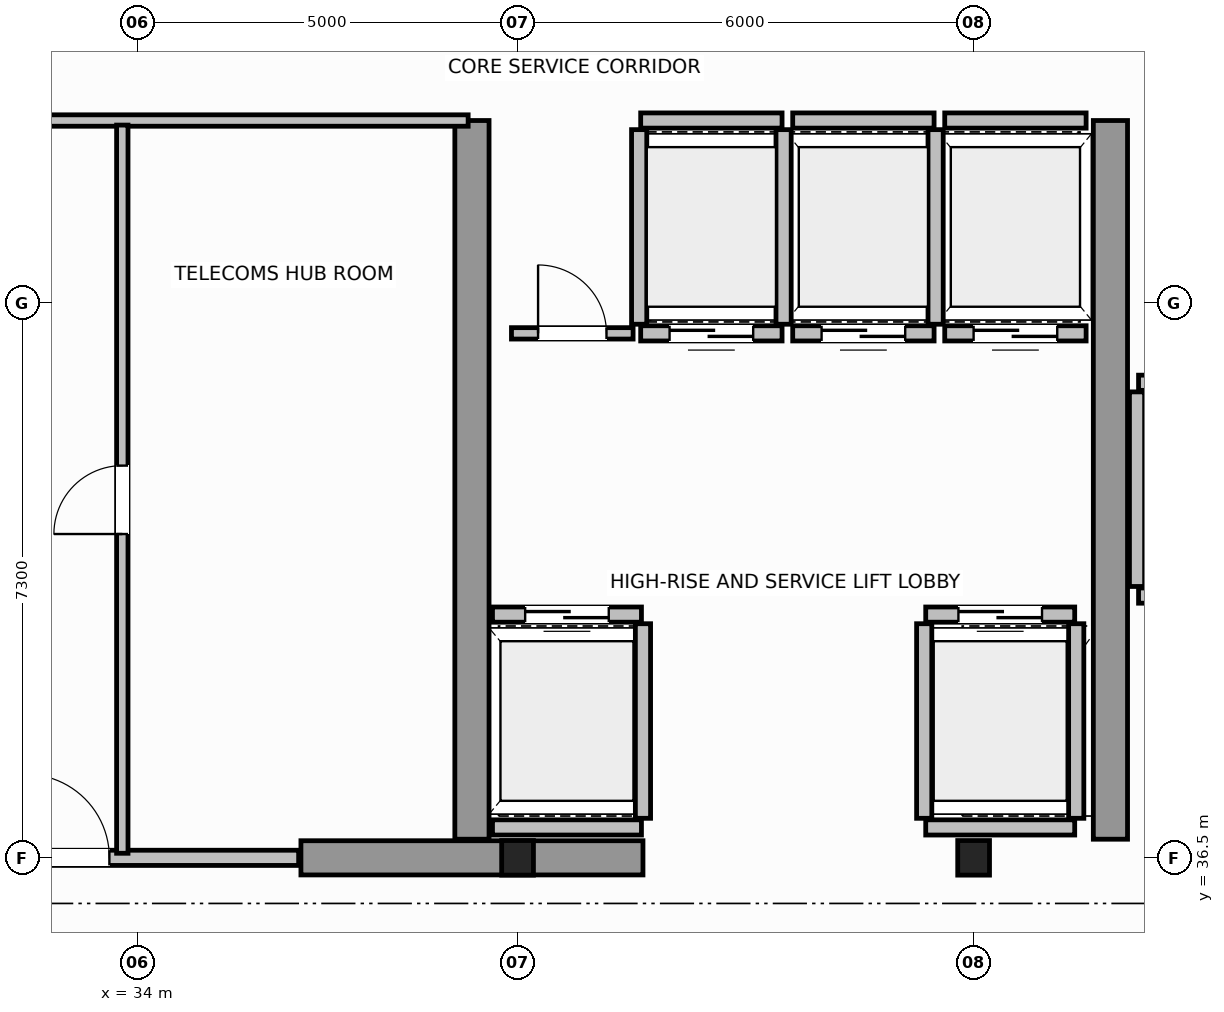
"""IFC4 building model, lengths in metres.
Left out: names, types, materials, properties, quantities, classifications, styles, units other than length and angle.
Written with IfcOpenShell. Run it as: python <this file> out.ifc"""

import sys

from ifc_helpers import new_model, si_unit, direction, frame, frame_2d, origin, origin_2d, place, context, subcontext, project, spatial, rectangle, i_section, extrude, source, transform, mapped, element, fill, save


model = new_model("IFC4")
c1 = context("Model", 3, precision=1e-05, world=origin(), true_north=direction((0.0, 1.0)))
c2 = subcontext(c1, "Body", "Model", "MODEL_VIEW")
j1 = project(units=[si_unit("LENGTHUNIT", "METRE"), si_unit("PLANEANGLEUNIT", "RADIAN")], contexts=[c1])
p1 = place(None, origin())
s1 = spatial("IfcSite", under=j1, at=p1, CompositionType="ELEMENT")
p2 = place(p1, origin())
s2 = spatial("IfcBuilding", under=s1, at=p2, CompositionType="ELEMENT")
p3 = place(p2, frame((0.0, 0.0, 268.8)))
s3 = spatial("IfcBuildingStorey", under=s2, at=p3, CompositionType="ELEMENT", Elevation=268.8)
m1 = source(origin(), c2, "Body", "SweptSolid", [
    extrude(i_section(OverallWidth=0.418, OverallDepth=0.455, WebThickness=0.042, FlangeThickness=0.058, FilletRadius=0.015, at=origin_2d()), origin(), (0.0, 0.0, 1.0), 3.8),
])
for number, where, z_axis, x_axis in (
    (1, (39.0, 36.5, 0.0), (0.0, 0.0, 1.0), (1.0, 0.0, 0.0)),
    (2, (45.0, 36.5, 0.0), (0.0, 0.0, 1.0), (1.0, 0.0, 0.0)),
):
    element("IfcColumn", number, at=place(p3, frame(where, z_axis=z_axis, x_axis=x_axis)), inside=s3, PredefinedType="COLUMN", context=c2, shape_type="MappedRepresentation", body=[
        mapped(m1, transform((0.0, 0.0, 0.0), scale=1.0)),
    ])
p4 = place(p3, frame((36.15, 36.5, 0.0), z_axis=(0.0, 0.0, 1.0), x_axis=(1.0, 0.0, 0.0)))
e3 = element("IfcWall", 3, at=p4, inside=s3, PredefinedType="SHEAR", context=c2, shape_type="SweptSolid", body=[
    extrude(rectangle(XDim=4.5, YDim=0.45, at=frame_2d((2.25, 0.0))), origin(), (0.0, 0.0, 1.0), 3.8),
])
for number, where, z_axis, x_axis in (
    (4, (38.4, 36.745, 0.0), (0.0, 0.0, 1.0), (0.0, 1.0, 0.0)),
    (5, (46.8, 36.745, 0.0), (0.0, 0.0, 1.0), (0.0, 1.0, 0.0)),
):
    element("IfcWall", number, at=place(p3, frame(where, z_axis=z_axis, x_axis=x_axis)), inside=s3, PredefinedType="SHEAR", context=c2, shape_type="SweptSolid", body=[
        extrude(rectangle(XDim=9.455, YDim=0.45, at=frame_2d((4.728, 0.0))), origin(), (0.0, 0.0, 1.0), 3.8),
    ])
p5 = place(p3, frame((38.67, 39.7, 0.0), z_axis=(0.0, 0.0, 1.0), x_axis=(1.0, 0.0, 0.0)))
e6 = element("IfcWall", 6, at=p5, inside=s3, PredefinedType="SOLIDWALL", context=c2, shape_type="SweptSolid", body=[
    extrude(rectangle(XDim=1.96, YDim=0.2, at=frame_2d((0.98, 0.0))), origin(), (0.0, 0.0, 1.0), 3.58),
])
p6 = place(p5, frame((0.43, 0.0, 0.0)))
e7 = element("IfcOpeningElement", 7, at=p6, cuts=e6, PredefinedType="OPENING", context=c2, shape_type="SweptSolid", body=[
    extrude(rectangle(XDim=1.1, YDim=2.15, at=frame_2d((0.55, 1.075))), frame((0.0, 0.11, 0.0), z_axis=(0.0, -1.0, 0.0), x_axis=(1.0, 0.0, 0.0)), (0.0, 0.0, 1.0), 0.22),
])
p7 = place(p3, frame((38.67, 36.9, 0.0), z_axis=(0.0, 0.0, 1.0), x_axis=(1.0, 0.0, 0.0)))
e8 = element("IfcWall", 8, at=p7, inside=s3, PredefinedType="SOLIDWALL", context=c2, shape_type="SweptSolid", body=[
    extrude(rectangle(XDim=1.96, YDim=0.2, at=frame_2d((0.98, 0.0))), origin(), (0.0, 0.0, 1.0), 3.58),
])
p8 = place(p3, frame((40.65, 37.02, 0.0), z_axis=(0.0, 0.0, 1.0), x_axis=(0.0, 1.0, 0.0)))
e9 = element("IfcWall", 9, at=p8, inside=s3, PredefinedType="SOLIDWALL", context=c2, shape_type="SweptSolid", body=[
    extrude(rectangle(XDim=2.56, YDim=0.2, at=frame_2d((1.28, 0.0))), origin(), (0.0, 0.0, 1.0), 3.58),
])
p9 = place(p3, frame((44.37, 39.7, 0.0), z_axis=(0.0, 0.0, 1.0), x_axis=(1.0, 0.0, 0.0)))
e10 = element("IfcWall", 10, at=p9, inside=s3, PredefinedType="SOLIDWALL", context=c2, shape_type="SweptSolid", body=[
    extrude(rectangle(XDim=1.96, YDim=0.2, at=frame_2d((0.98, 0.0))), origin(), (0.0, 0.0, 1.0), 3.58),
])
p10 = place(p9, frame((0.43, 0.0, 0.0)))
e11 = element("IfcOpeningElement", 11, at=p10, cuts=e10, PredefinedType="OPENING", context=c2, shape_type="SweptSolid", body=[
    extrude(rectangle(XDim=1.1, YDim=2.15, at=frame_2d((0.55, 1.075))), frame((0.0, 0.11, 0.0), z_axis=(0.0, -1.0, 0.0), x_axis=(1.0, 0.0, 0.0)), (0.0, 0.0, 1.0), 0.22),
])
p11 = place(p3, frame((44.37, 36.9, 0.0), z_axis=(0.0, 0.0, 1.0), x_axis=(1.0, 0.0, 0.0)))
e12 = element("IfcWall", 12, at=p11, inside=s3, PredefinedType="SOLIDWALL", context=c2, shape_type="SweptSolid", body=[
    extrude(rectangle(XDim=1.96, YDim=0.2, at=frame_2d((0.98, 0.0))), origin(), (0.0, 0.0, 1.0), 2.57),
])
for number, where, z_axis, x_axis in (
    (13, (44.35, 37.02, 0.0), (0.0, 0.0, 1.0), (0.0, 1.0, 0.0)),
    (14, (46.35, 37.02, 0.0), (0.0, 0.0, 1.0), (0.0, 1.0, 0.0)),
):
    element("IfcWall", number, at=place(p3, frame(where, z_axis=z_axis, x_axis=x_axis)), inside=s3, PredefinedType="SOLIDWALL", context=c2, shape_type="SweptSolid", body=[
        extrude(rectangle(XDim=2.56, YDim=0.2, at=frame_2d((1.28, 0.0))), origin(), (0.0, 0.0, 1.0), 3.58),
    ])
p12 = place(p3, frame((40.62, 43.4, 0.0), z_axis=(0.0, 0.0, 1.0), x_axis=(1.0, 0.0, 0.0)))
e15 = element("IfcWall", 15, at=p12, inside=s3, PredefinedType="SOLIDWALL", context=c2, shape_type="SweptSolid", body=[
    extrude(rectangle(XDim=1.86, YDim=0.2, at=frame_2d((0.93, 0.0))), origin(), (0.0, 0.0, 1.0), 3.58),
])
p13 = place(p12, frame((0.38, 0.0, 0.0)))
e16 = element("IfcOpeningElement", 16, at=p13, cuts=e15, PredefinedType="OPENING", context=c2, shape_type="SweptSolid", body=[
    extrude(rectangle(XDim=1.1, YDim=2.15, at=frame_2d((0.55, 1.075))), frame((0.0, 0.11, 0.0), z_axis=(0.0, -1.0, 0.0), x_axis=(1.0, 0.0, 0.0)), (0.0, 0.0, 1.0), 0.22),
])
p14 = place(p3, frame((40.62, 46.2, 0.0), z_axis=(0.0, 0.0, 1.0), x_axis=(1.0, 0.0, 0.0)))
e17 = element("IfcWall", 17, at=p14, inside=s3, PredefinedType="SOLIDWALL", context=c2, shape_type="SweptSolid", body=[
    extrude(rectangle(XDim=1.86, YDim=0.2, at=frame_2d((0.93, 0.0))), origin(), (0.0, 0.0, 1.0), 3.58),
])
for number, where, z_axis, x_axis in (
    (18, (40.6, 43.52, 0.0), (0.0, 0.0, 1.0), (0.0, 1.0, 0.0)),
    (19, (42.5, 43.52, 0.0), (0.0, 0.0, 1.0), (0.0, 1.0, 0.0)),
):
    element("IfcWall", number, at=place(p3, frame(where, z_axis=z_axis, x_axis=x_axis)), inside=s3, PredefinedType="SOLIDWALL", context=c2, shape_type="SweptSolid", body=[
        extrude(rectangle(XDim=2.56, YDim=0.2, at=frame_2d((1.28, 0.0))), origin(), (0.0, 0.0, 1.0), 3.58),
    ])
p15 = place(p3, frame((42.62, 43.4, 0.0), z_axis=(0.0, 0.0, 1.0), x_axis=(1.0, 0.0, 0.0)))
e20 = element("IfcWall", 20, at=p15, inside=s3, PredefinedType="SOLIDWALL", context=c2, shape_type="SweptSolid", body=[
    extrude(rectangle(XDim=1.86, YDim=0.2, at=frame_2d((0.93, 0.0))), origin(), (0.0, 0.0, 1.0), 3.58),
])
p16 = place(p15, frame((0.38, 0.0, 0.0)))
e21 = element("IfcOpeningElement", 21, at=p16, cuts=e20, PredefinedType="OPENING", context=c2, shape_type="SweptSolid", body=[
    extrude(rectangle(XDim=1.1, YDim=2.15, at=frame_2d((0.55, 1.075))), frame((0.0, 0.11, 0.0), z_axis=(0.0, -1.0, 0.0), x_axis=(1.0, 0.0, 0.0)), (0.0, 0.0, 1.0), 0.22),
])
p17 = place(p3, frame((42.62, 46.2, 0.0), z_axis=(0.0, 0.0, 1.0), x_axis=(1.0, 0.0, 0.0)))
e22 = element("IfcWall", 22, at=p17, inside=s3, PredefinedType="SOLIDWALL", context=c2, shape_type="SweptSolid", body=[
    extrude(rectangle(XDim=1.86, YDim=0.2, at=frame_2d((0.93, 0.0))), origin(), (0.0, 0.0, 1.0), 3.58),
])
p18 = place(p3, frame((44.5, 43.52, 0.0), z_axis=(0.0, 0.0, 1.0), x_axis=(0.0, 1.0, 0.0)))
e23 = element("IfcWall", 23, at=p18, inside=s3, PredefinedType="SOLIDWALL", context=c2, shape_type="SweptSolid", body=[
    extrude(rectangle(XDim=2.56, YDim=0.2, at=frame_2d((1.28, 0.0))), origin(), (0.0, 0.0, 1.0), 3.58),
])
p19 = place(p3, frame((44.62, 43.4, 0.0), z_axis=(0.0, 0.0, 1.0), x_axis=(1.0, 0.0, 0.0)))
e24 = element("IfcWall", 24, at=p19, inside=s3, PredefinedType="SOLIDWALL", context=c2, shape_type="SweptSolid", body=[
    extrude(rectangle(XDim=1.86, YDim=0.2, at=frame_2d((0.93, 0.0))), origin(), (0.0, 0.0, 1.0), 3.58),
])
p20 = place(p19, frame((0.38, 0.0, 0.0)))
e25 = element("IfcOpeningElement", 25, at=p20, cuts=e24, PredefinedType="OPENING", context=c2, shape_type="SweptSolid", body=[
    extrude(rectangle(XDim=1.1, YDim=2.15, at=frame_2d((0.55, 1.075))), frame((0.0, 0.11, 0.0), z_axis=(0.0, -1.0, 0.0), x_axis=(1.0, 0.0, 0.0)), (0.0, 0.0, 1.0), 0.22),
])
p21 = place(p3, frame((44.62, 46.2, 0.0), z_axis=(0.0, 0.0, 1.0), x_axis=(1.0, 0.0, 0.0)))
e26 = element("IfcWall", 26, at=p21, inside=s3, PredefinedType="SOLIDWALL", context=c2, shape_type="SweptSolid", body=[
    extrude(rectangle(XDim=1.86, YDim=0.2, at=frame_2d((0.93, 0.0))), origin(), (0.0, 0.0, 1.0), 3.58),
])
p22 = place(p3, frame((47.17, 39.95, 0.0), z_axis=(0.0, 0.0, 1.0), x_axis=(1.0, 0.0, 0.0)))
e27 = element("IfcWall", 27, at=p22, inside=s3, PredefinedType="SOLIDWALL", context=c2, shape_type="SweptSolid", body=[
    extrude(rectangle(XDim=2.16, YDim=0.2, at=frame_2d((1.08, 0.0))), origin(), (0.0, 0.0, 1.0), 3.58),
])
p23 = place(p22, frame((0.53, 0.0, 0.0)))
e28 = element("IfcOpeningElement", 28, at=p23, cuts=e27, PredefinedType="OPENING", context=c2, shape_type="SweptSolid", body=[
    extrude(rectangle(XDim=1.1, YDim=2.15, at=frame_2d((0.55, 1.075))), frame((0.0, 0.11, 0.0), z_axis=(0.0, -1.0, 0.0), x_axis=(1.0, 0.0, 0.0)), (0.0, 0.0, 1.0), 0.22),
])
p24 = place(p3, frame((47.17, 42.75, 0.0), z_axis=(0.0, 0.0, 1.0), x_axis=(1.0, 0.0, 0.0)))
e29 = element("IfcWall", 29, at=p24, inside=s3, PredefinedType="SOLIDWALL", context=c2, shape_type="SweptSolid", body=[
    extrude(rectangle(XDim=2.16, YDim=0.2, at=frame_2d((1.08, 0.0))), origin(), (0.0, 0.0, 1.0), 3.58),
])
p25 = place(p3, frame((47.15, 40.07, 0.0), z_axis=(0.0, 0.0, 1.0), x_axis=(0.0, 1.0, 0.0)))
e30 = element("IfcWall", 30, at=p25, inside=s3, PredefinedType="SOLIDWALL", context=c2, shape_type="SweptSolid", body=[
    extrude(rectangle(XDim=2.56, YDim=0.2, at=frame_2d((1.28, 0.0))), origin(), (0.0, 0.0, 1.0), 3.58),
])
p26 = place(p3, frame((32.08, 36.5, 0.0), z_axis=(0.0, 0.0, 1.0), x_axis=(1.0, 0.0, 0.0)))
e31 = element("IfcWall", 31, at=p26, inside=s3, PredefinedType="SOLIDWALL", context=c2, shape_type="SweptSolid", body=[
    extrude(rectangle(XDim=4.04, YDim=0.2, at=frame_2d((2.02, 0.0))), origin(), (0.0, 0.0, 1.0), 3.02),
])
p27 = place(p26, frame((0.45, 0.0, 0.0)))
e32 = element("IfcOpeningElement", 32, at=p27, cuts=e31, PredefinedType="OPENING", context=c2, shape_type="SweptSolid", body=[
    extrude(rectangle(XDim=1.1, YDim=2.15, at=frame_2d((0.55, 1.075))), frame((0.0, 0.11, 0.0), z_axis=(0.0, -1.0, 0.0), x_axis=(1.0, 0.0, 0.0)), (0.0, 0.0, 1.0), 0.22),
])
p28 = place(p3, frame((29.85, 46.2, 0.0), z_axis=(0.0, 0.0, 1.0), x_axis=(1.0, 0.0, 0.0)))
e33 = element("IfcWall", 33, at=p28, inside=s3, PredefinedType="PARTITIONING", context=c2, shape_type="SweptSolid", body=[
    extrude(rectangle(XDim=8.5, YDim=0.15, at=frame_2d((4.25, 0.0))), origin(), (0.0, 0.0, 1.0), 3.58),
])
p29 = place(p3, frame((33.8, 36.56, 0.0), z_axis=(0.0, 0.0, 1.0), x_axis=(0.0, 1.0, 0.0)))
e34 = element("IfcWall", 34, at=p29, inside=s3, PredefinedType="PARTITIONING", context=c2, shape_type="SweptSolid", body=[
    extrude(rectangle(XDim=9.58, YDim=0.15, at=frame_2d((4.79, 0.0))), origin(), (0.0, 0.0, 1.0), 3.58),
])
p30 = place(p29, frame((4.2, 0.0, 0.0)))
e35 = element("IfcOpeningElement", 35, at=p30, cuts=e34, PredefinedType="OPENING", context=c2, shape_type="SweptSolid", body=[
    extrude(rectangle(XDim=0.9, YDim=2.1, at=frame_2d((0.45, 1.05))), frame((0.0, 0.085, 0.0), z_axis=(0.0, -1.0, 0.0), x_axis=(1.0, 0.0, 0.0)), (0.0, 0.0, 1.0), 0.17),
])
p31 = place(p3, frame((38.92, 43.4, 0.0), z_axis=(0.0, 0.0, 1.0), x_axis=(1.0, 0.0, 0.0)))
e36 = element("IfcWall", 36, at=p31, inside=s3, PredefinedType="PARTITIONING", context=c2, shape_type="SweptSolid", body=[
    extrude(rectangle(XDim=1.6, YDim=0.15, at=frame_2d((0.8, 0.0))), origin(), (0.0, 0.0, 1.0), 3.58),
])
p32 = place(p31, frame((0.35, 0.0, 0.0)))
e37 = element("IfcOpeningElement", 37, at=p32, cuts=e36, PredefinedType="OPENING", context=c2, shape_type="SweptSolid", body=[
    extrude(rectangle(XDim=0.9, YDim=2.1, at=frame_2d((0.45, 1.05))), frame((0.0, 0.085, 0.0), z_axis=(0.0, -1.0, 0.0), x_axis=(1.0, 0.0, 0.0)), (0.0, 0.0, 1.0), 0.17),
])
m2 = source(origin(), c2, "Body", "SweptSolid", [
    extrude(rectangle(XDim=1.1, YDim=2.15, at=frame_2d((0.55, 1.075))), frame((0.0, 0.025, 0.0), z_axis=(0.0, -1.0, 0.0), x_axis=(1.0, 0.0, 0.0)), (0.0, 0.0, 1.0), 0.05),
])
p33 = place(p6, origin())
e38 = element("IfcDoor", 38, at=p33, inside=s3, OperationType="DOUBLE_DOOR_SLIDING", PredefinedType="DOOR", context=c2, shape_type="MappedRepresentation", body=[
    mapped(m2, transform((0.0, 0.0, 0.0), scale=1.0)),
])
fill(e7, e38)
p34 = place(p10, origin())
e39 = element("IfcDoor", 39, at=p34, inside=s3, OperationType="DOUBLE_DOOR_SLIDING", PredefinedType="DOOR", context=c2, shape_type="MappedRepresentation", body=[
    mapped(m2, transform((0.0, 0.0, 0.0), scale=1.0)),
])
fill(e11, e39)
p35 = place(p13, origin())
e40 = element("IfcDoor", 40, at=p35, inside=s3, OperationType="DOUBLE_DOOR_SLIDING", PredefinedType="DOOR", context=c2, shape_type="MappedRepresentation", body=[
    mapped(m2, transform((0.0, 0.0, 0.0), scale=1.0)),
])
fill(e16, e40)
p36 = place(p16, origin())
e41 = element("IfcDoor", 41, at=p36, inside=s3, OperationType="DOUBLE_DOOR_SLIDING", PredefinedType="DOOR", context=c2, shape_type="MappedRepresentation", body=[
    mapped(m2, transform((0.0, 0.0, 0.0), scale=1.0)),
])
fill(e21, e41)
p37 = place(p20, origin())
e42 = element("IfcDoor", 42, at=p37, inside=s3, OperationType="DOUBLE_DOOR_SLIDING", PredefinedType="DOOR", context=c2, shape_type="MappedRepresentation", body=[
    mapped(m2, transform((0.0, 0.0, 0.0), scale=1.0)),
])
fill(e25, e42)
p38 = place(p27, origin())
e43 = element("IfcDoor", 43, at=p38, inside=s3, OperationType="SINGLE_SWING_LEFT", PredefinedType="DOOR", context=c2, shape_type="MappedRepresentation", body=[
    mapped(m2, transform((0.0, 0.0, 0.0), scale=1.0)),
])
fill(e32, e43)
m3 = source(origin(), c2, "Body", "SweptSolid", [
    extrude(rectangle(XDim=0.9, YDim=2.1, at=frame_2d((0.45, 1.05))), frame((0.0, 0.025, 0.0), z_axis=(0.0, -1.0, 0.0), x_axis=(1.0, 0.0, 0.0)), (0.0, 0.0, 1.0), 0.05),
])
p39 = place(p30, origin())
e44 = element("IfcDoor", 44, at=p39, inside=s3, OperationType="SINGLE_SWING_RIGHT", PredefinedType="DOOR", context=c2, shape_type="MappedRepresentation", body=[
    mapped(m3, transform((0.0, 0.0, 0.0), scale=1.0)),
])
fill(e35, e44)
p40 = place(p32, origin())
e45 = element("IfcDoor", 45, at=p40, inside=s3, OperationType="SINGLE_SWING_LEFT", PredefinedType="DOOR", context=c2, shape_type="MappedRepresentation", body=[
    mapped(m3, transform((0.0, 0.0, 0.0), scale=1.0)),
])
fill(e37, e45)
save(model, sys.argv[1])
